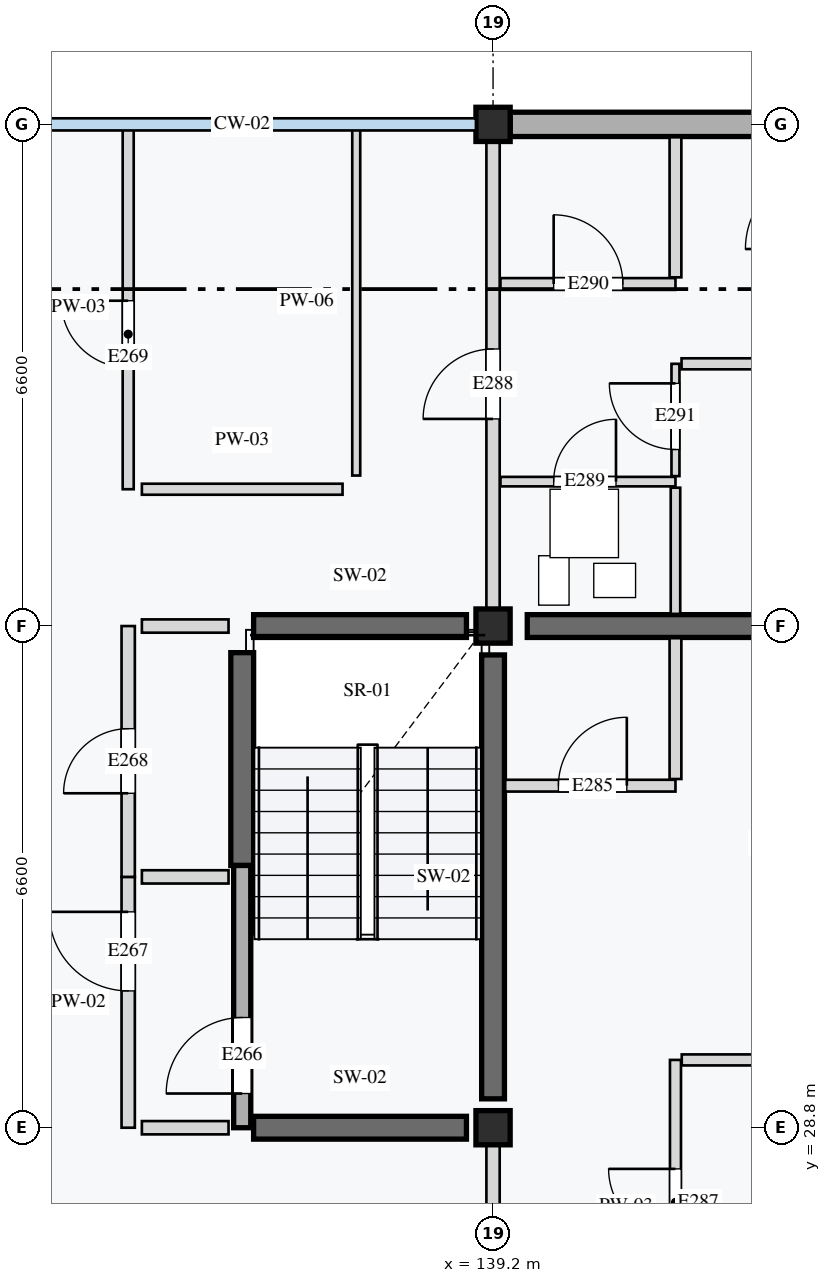
"""IFC4 building model, lengths in metres.
Left out: names, types, materials, properties, quantities, classifications, styles, units other than length and angle.
Written with IfcOpenShell. Run it as: python <this file> out.ifc"""

import sys

from ifc_helpers import new_model, si_unit, direction, frame, frame_2d, origin, origin_2d, place, context, subcontext, project, spatial, rectangle, extrude, element, fill, save


model = new_model("IFC4")
c1 = context("Model", 3, precision=1e-05, world=origin(), true_north=direction((0.0, 1.0)))
c2 = subcontext(c1, "Body", "Model", "MODEL_VIEW")
j1 = project(units=[si_unit("LENGTHUNIT", "METRE"), si_unit("PLANEANGLEUNIT", "RADIAN")], contexts=[c1])
p1 = place(None, origin())
s1 = spatial("IfcSite", under=j1, at=p1, CompositionType="ELEMENT")
p2 = place(p1, origin())
s2 = spatial("IfcBuilding", under=s1, at=p2, CompositionType="ELEMENT")
p3 = place(p2, frame((0.0, 0.0, 21.2)))
s3 = spatial("IfcBuildingStorey", under=s2, at=p3, CompositionType="ELEMENT", Elevation=21.2)
for number, where, z_axis, x_axis in (
    (1, (139.2, 28.8, 0.0), (0.0, 0.0, 1.0), (1.0, 0.0, 0.0)),
    (2, (139.2, 35.4, 0.0), (0.0, 0.0, 1.0), (1.0, 0.0, 0.0)),
    (3, (139.2, 42.0, 0.0), (0.0, 0.0, 1.0), (1.0, 0.0, 0.0)),
):
    element("IfcColumn", number, at=place(p3, frame(where, z_axis=z_axis, x_axis=x_axis)), inside=s3, PredefinedType="COLUMN", context=c2, shape_type="SweptSolid", body=[
        extrude(rectangle(XDim=0.45, YDim=0.45, at=origin_2d()), origin(), (0.0, 0.0, 1.0), 3.2),
    ])
p4 = place(p3, frame((139.2, 29.18, 0.0), z_axis=(0.0, 0.0, 1.0), x_axis=(0.0, 1.0, 0.0)))
e4 = element("IfcWall", 4, at=p4, inside=s3, PredefinedType="SHEAR", context=c2, shape_type="SweptSolid", body=[
    extrude(rectangle(XDim=5.84, YDim=0.3, at=frame_2d((2.92, 0.0))), origin(), (0.0, 0.0, 1.0), 2.96),
])
for number, where, z_axis, x_axis in (
    (5, (135.9, 32.25, 0.0), (0.0, 0.0, 1.0), (0.0, 1.0, 0.0)),
    (6, (136.05, 28.8, 0.0), (0.0, 0.0, 1.0), (1.0, 0.0, 0.0)),
    (7, (136.05, 35.4, 0.0), (0.0, 0.0, 1.0), (1.0, 0.0, 0.0)),
):
    element("IfcWall", number, at=place(p3, frame(where, z_axis=z_axis, x_axis=x_axis)), inside=s3, PredefinedType="SHEAR", context=c2, shape_type="SweptSolid", body=[
        extrude(rectangle(XDim=2.8, YDim=0.3, at=frame_2d((1.4, 0.0))), origin(), (0.0, 0.0, 1.0), 2.96),
    ])
p5 = place(p3, frame((139.65, 35.4, 0.0), z_axis=(0.0, 0.0, 1.0), x_axis=(1.0, 0.0, 0.0)))
e8 = element("IfcWall", 8, at=p5, inside=s3, PredefinedType="SHEAR", context=c2, shape_type="SweptSolid", body=[
    extrude(rectangle(XDim=5.7, YDim=0.3, at=frame_2d((2.85, 0.0))), origin(), (0.0, 0.0, 1.0), 2.96),
])
p6 = place(p3, frame((139.425, 42.0, 0.0), z_axis=(0.0, 0.0, 1.0), x_axis=(1.0, 0.0, 0.0)))
e9 = element("IfcWall", 9, at=p6, inside=s3, PredefinedType="STANDARD", context=c2, shape_type="SweptSolid", body=[
    extrude(rectangle(XDim=4.015, YDim=0.32, at=frame_2d((2.007, 0.0))), origin(), (0.0, 0.0, 1.0), 2.65),
])
p7 = place(p3, frame((135.9, 28.8, 0.0), z_axis=(0.0, 0.0, 1.0), x_axis=(0.0, 1.0, 0.0)))
e10 = element("IfcWall", 10, at=p7, inside=s3, PredefinedType="STANDARD", context=c2, shape_type="SweptSolid", body=[
    extrude(rectangle(XDim=3.45, YDim=0.225, at=frame_2d((1.725, 0.0))), origin(), (0.0, 0.0, 1.0), 2.96),
])
p8 = place(p7, frame((0.45, 0.0, 0.0)))
e11 = element("IfcOpeningElement", 11, at=p8, cuts=e10, PredefinedType="OPENING", context=c2, shape_type="SweptSolid", body=[
    extrude(rectangle(XDim=1.0, YDim=2.16, at=frame_2d((0.5, 1.08))), frame((0.0, 0.123, 0.0), z_axis=(0.0, -1.0, 0.0), x_axis=(1.0, 0.0, 0.0)), (0.0, 0.0, 1.0), 0.245),
])
p9 = place(p3, frame((134.4, 28.8, 0.0), z_axis=(0.0, 0.0, 1.0), x_axis=(0.0, 1.0, 0.0)))
e12 = element("IfcWall", 12, at=p9, inside=s3, PredefinedType="PARTITIONING", context=c2, shape_type="SweptSolid", body=[
    extrude(rectangle(XDim=3.3, YDim=0.175, at=frame_2d((1.65, 0.0))), origin(), (0.0, 0.0, 1.0), 2.96),
])
p10 = place(p9, frame((1.8, 0.0, 0.0)))
e13 = element("IfcOpeningElement", 13, at=p10, cuts=e12, PredefinedType="OPENING", context=c2, shape_type="SweptSolid", body=[
    extrude(rectangle(XDim=1.04, YDim=2.12, at=frame_2d((0.52, 1.06))), frame((0.0, 0.097, 0.0), z_axis=(0.0, -1.0, 0.0), x_axis=(1.0, 0.0, 0.0)), (0.0, 0.0, 1.0), 0.195),
])
p11 = place(p3, frame((134.4, 32.1, 0.0), z_axis=(0.0, 0.0, 1.0), x_axis=(0.0, 1.0, 0.0)))
e14 = element("IfcWall", 14, at=p11, inside=s3, PredefinedType="PARTITIONING", context=c2, shape_type="SweptSolid", body=[
    extrude(rectangle(XDim=3.3, YDim=0.175, at=frame_2d((1.65, 0.0))), origin(), (0.0, 0.0, 1.0), 2.96),
])
p12 = place(p11, frame((1.1, 0.0, 0.0)))
e15 = element("IfcOpeningElement", 15, at=p12, cuts=e14, PredefinedType="OPENING", context=c2, shape_type="SweptSolid", body=[
    extrude(rectangle(XDim=0.85, YDim=2.0, at=frame_2d((0.425, 1.0))), frame((0.0, 0.097, 0.0), z_axis=(0.0, -1.0, 0.0), x_axis=(1.0, 0.0, 0.0)), (0.0, 0.0, 1.0), 0.195),
])
for number, where, z_axis, x_axis in (
    (16, (134.58, 28.8, 0.0), (0.0, 0.0, 1.0), (1.0, 0.0, 0.0)),
    (17, (134.58, 32.1, 0.0), (0.0, 0.0, 1.0), (1.0, 0.0, 0.0)),
    (18, (134.58, 35.4, 0.0), (0.0, 0.0, 1.0), (1.0, 0.0, 0.0)),
):
    element("IfcWall", number, at=place(p3, frame(where, z_axis=z_axis, x_axis=x_axis)), inside=s3, PredefinedType="PARTITIONING", context=c2, shape_type="SweptSolid", body=[
        extrude(rectangle(XDim=1.14, YDim=0.175, at=frame_2d((0.57, 0.0))), origin(), (0.0, 0.0, 1.0), 2.96),
    ])
p13 = place(p3, frame((134.4, 37.2, 0.0), z_axis=(0.0, 0.0, 1.0), x_axis=(0.0, 1.0, 0.0)))
e19 = element("IfcWall", 19, at=p13, inside=s3, PredefinedType="PARTITIONING", context=c2, shape_type="SweptSolid", body=[
    extrude(rectangle(XDim=4.8, YDim=0.145, at=frame_2d((2.4, 0.0))), origin(), (0.0, 0.0, 1.0), 2.96),
])
p14 = place(p13, frame((1.6, 0.0, 0.0)))
e20 = element("IfcOpeningElement", 20, at=p14, cuts=e19, PredefinedType="OPENING", context=c2, shape_type="SweptSolid", body=[
    extrude(rectangle(XDim=0.88, YDim=2.1, at=frame_2d((0.44, 1.05))), frame((0.0, 0.083, 0.0), z_axis=(0.0, -1.0, 0.0), x_axis=(1.0, 0.0, 0.0)), (0.0, 0.0, 1.0), 0.165),
])
p15 = place(p3, frame((137.4, 37.38, 0.0), z_axis=(0.0, 0.0, 1.0), x_axis=(0.0, 1.0, 0.0)))
e21 = element("IfcWall", 21, at=p15, inside=s3, PredefinedType="PARTITIONING", context=c2, shape_type="SweptSolid", body=[
    extrude(rectangle(XDim=4.6, YDim=0.105, at=frame_2d((2.3, 0.0))), origin(), (0.0, 0.0, 1.0), 2.96),
])
p16 = place(p3, frame((134.58, 37.2, 0.0), z_axis=(0.0, 0.0, 1.0), x_axis=(1.0, 0.0, 0.0)))
e22 = element("IfcWall", 22, at=p16, inside=s3, PredefinedType="PARTITIONING", context=c2, shape_type="SweptSolid", body=[
    extrude(rectangle(XDim=2.64, YDim=0.145, at=frame_2d((1.32, 0.0))), origin(), (0.0, 0.0, 1.0), 2.96),
])
p17 = place(p3, frame((139.2, 22.2, 0.0), z_axis=(0.0, 0.0, 1.0), x_axis=(0.0, 1.0, 0.0)))
e23 = element("IfcWall", 23, at=p17, inside=s3, PredefinedType="PARTITIONING", context=c2, shape_type="SweptSolid", body=[
    extrude(rectangle(XDim=6.6, YDim=0.175, at=frame_2d((3.3, 0.0))), origin(), (0.0, 0.0, 1.0), 2.55),
])
p18 = place(p17, frame((3.85, 0.0, 0.0)))
e24 = element("IfcOpeningElement", 24, at=p18, cuts=e23, PredefinedType="OPENING", context=c2, shape_type="SweptSolid", body=[
    extrude(rectangle(XDim=0.95, YDim=2.16, at=frame_2d((0.475, 1.08))), frame((0.0, 0.097, 0.0), z_axis=(0.0, -1.0, 0.0), x_axis=(1.0, 0.0, 0.0)), (0.0, 0.0, 1.0), 0.195),
])
p19 = place(p3, frame((139.36, 33.3, 0.0), z_axis=(0.0, 0.0, 1.0), x_axis=(1.0, 0.0, 0.0)))
e25 = element("IfcWall", 25, at=p19, inside=s3, PredefinedType="PARTITIONING", context=c2, shape_type="SweptSolid", body=[
    extrude(rectangle(XDim=2.24, YDim=0.155, at=frame_2d((1.12, 0.0))), origin(), (0.0, 0.0, 1.0), 2.96),
])
p20 = place(p19, frame((0.7, 0.0, 0.0)))
e26 = element("IfcOpeningElement", 26, at=p20, cuts=e25, PredefinedType="OPENING", context=c2, shape_type="SweptSolid", body=[
    extrude(rectangle(XDim=0.9, YDim=2.16, at=frame_2d((0.45, 1.08))), frame((0.0, 0.087, 0.0), z_axis=(0.0, -1.0, 0.0), x_axis=(1.0, 0.0, 0.0)), (0.0, 0.0, 1.0), 0.175),
])
p21 = place(p3, frame((141.6, 33.387, 0.0), z_axis=(0.0, 0.0, 1.0), x_axis=(0.0, 1.0, 0.0)))
e27 = element("IfcWall", 27, at=p21, inside=s3, PredefinedType="PARTITIONING", context=c2, shape_type="SweptSolid", body=[
    extrude(rectangle(XDim=1.853, YDim=0.155, at=frame_2d((0.926, 0.0))), origin(), (0.0, 0.0, 1.0), 2.96),
])
p22 = place(p3, frame((141.6, 25.833, 0.0), z_axis=(0.0, 0.0, 1.0), x_axis=(0.0, 1.0, 0.0)))
e28 = element("IfcWall", 28, at=p22, inside=s3, PredefinedType="PARTITIONING", context=c2, shape_type="SweptSolid", body=[
    extrude(rectangle(XDim=3.859, YDim=0.145, at=frame_2d((1.93, 0.0))), origin(), (0.0, 0.0, 1.0), 2.96),
])
p23 = place(p22, frame((1.546, 0.0, 0.0)))
e29 = element("IfcOpeningElement", 29, at=p23, cuts=e28, PredefinedType="OPENING", context=c2, shape_type="SweptSolid", body=[
    extrude(rectangle(XDim=0.88, YDim=2.1, at=frame_2d((0.44, 1.05))), frame((0.0, 0.083, 0.0), z_axis=(0.0, -1.0, 0.0), x_axis=(1.0, 0.0, 0.0)), (0.0, 0.0, 1.0), 0.165),
])
p24 = place(p3, frame((141.683, 29.692, 0.0), z_axis=(0.0, 0.0, 1.0), x_axis=(1.0, 0.0, 0.0)))
e30 = element("IfcWall", 30, at=p24, inside=s3, PredefinedType="PARTITIONING", context=c2, shape_type="SweptSolid", body=[
    extrude(rectangle(XDim=3.947, YDim=0.145, at=frame_2d((1.974, 0.0))), origin(), (0.0, 0.0, 1.0), 2.96),
])
p25 = place(p3, frame((139.2, 35.4, 0.0), z_axis=(0.0, 0.0, 1.0), x_axis=(0.0, 1.0, 0.0)))
e31 = element("IfcWall", 31, at=p25, inside=s3, PredefinedType="PARTITIONING", context=c2, shape_type="SweptSolid", body=[
    extrude(rectangle(XDim=6.6, YDim=0.175, at=frame_2d((3.3, 0.0))), origin(), (0.0, 0.0, 1.0), 2.55),
])
p26 = place(p25, frame((2.725, 0.0, 0.0)))
e32 = element("IfcOpeningElement", 32, at=p26, cuts=e31, PredefinedType="OPENING", context=c2, shape_type="SweptSolid", body=[
    extrude(rectangle(XDim=0.92, YDim=2.14, at=frame_2d((0.46, 1.07))), frame((0.0, 0.097, 0.0), z_axis=(0.0, -1.0, 0.0), x_axis=(1.0, 0.0, 0.0)), (0.0, 0.0, 1.0), 0.195),
])
p27 = place(p3, frame((139.298, 37.3, 0.0), z_axis=(0.0, 0.0, 1.0), x_axis=(1.0, 0.0, 0.0)))
e33 = element("IfcWall", 33, at=p27, inside=s3, PredefinedType="PARTITIONING", context=c2, shape_type="SweptSolid", body=[
    extrude(rectangle(XDim=2.302, YDim=0.125, at=frame_2d((1.151, 0.0))), origin(), (0.0, 0.0, 1.0), 2.96),
])
p28 = place(p27, frame((0.7, 0.0, 0.0)))
e34 = element("IfcOpeningElement", 34, at=p28, cuts=e33, PredefinedType="OPENING", context=c2, shape_type="SweptSolid", body=[
    extrude(rectangle(XDim=0.82, YDim=2.05, at=frame_2d((0.41, 1.025))), frame((0.0, 0.073, 0.0), z_axis=(0.0, -1.0, 0.0), x_axis=(1.0, 0.0, 0.0)), (0.0, 0.0, 1.0), 0.145),
])
p29 = place(p3, frame((141.6, 35.56, 0.0), z_axis=(0.0, 0.0, 1.0), x_axis=(0.0, 1.0, 0.0)))
e35 = element("IfcWall", 35, at=p29, inside=s3, PredefinedType="PARTITIONING", context=c2, shape_type="SweptSolid", body=[
    extrude(rectangle(XDim=1.66, YDim=0.125, at=frame_2d((0.83, 0.0))), origin(), (0.0, 0.0, 1.0), 2.96),
])
p30 = place(p3, frame((139.298, 39.9, 0.0), z_axis=(0.0, 0.0, 1.0), x_axis=(1.0, 0.0, 0.0)))
e36 = element("IfcWall", 36, at=p30, inside=s3, PredefinedType="PARTITIONING", context=c2, shape_type="SweptSolid", body=[
    extrude(rectangle(XDim=2.302, YDim=0.155, at=frame_2d((1.151, 0.0))), origin(), (0.0, 0.0, 1.0), 2.96),
])
p31 = place(p30, frame((0.7, 0.0, 0.0)))
e37 = element("IfcOpeningElement", 37, at=p31, cuts=e36, PredefinedType="OPENING", context=c2, shape_type="SweptSolid", body=[
    extrude(rectangle(XDim=0.91, YDim=2.14, at=frame_2d((0.455, 1.07))), frame((0.0, 0.087, 0.0), z_axis=(0.0, -1.0, 0.0), x_axis=(1.0, 0.0, 0.0)), (0.0, 0.0, 1.0), 0.175),
])
p32 = place(p3, frame((141.6, 39.988, 0.0), z_axis=(0.0, 0.0, 1.0), x_axis=(0.0, 1.0, 0.0)))
e38 = element("IfcWall", 38, at=p32, inside=s3, PredefinedType="PARTITIONING", context=c2, shape_type="SweptSolid", body=[
    extrude(rectangle(XDim=1.843, YDim=0.155, at=frame_2d((0.921, 0.0))), origin(), (0.0, 0.0, 1.0), 2.96),
])
p33 = place(p3, frame((141.6, 37.373, 0.0), z_axis=(0.0, 0.0, 1.0), x_axis=(0.0, 1.0, 0.0)))
e39 = element("IfcWall", 39, at=p33, inside=s3, PredefinedType="PARTITIONING", context=c2, shape_type="SweptSolid", body=[
    extrude(rectangle(XDim=1.478, YDim=0.105, at=frame_2d((0.739, 0.0))), origin(), (0.0, 0.0, 1.0), 2.96),
])
p34 = place(p33, frame((0.35, 0.0, 0.0)))
e40 = element("IfcOpeningElement", 40, at=p34, cuts=e39, PredefinedType="OPENING", context=c2, shape_type="SweptSolid", body=[
    extrude(rectangle(XDim=0.87, YDim=2.08, at=frame_2d((0.435, 1.04))), frame((0.0, 0.062, 0.0), z_axis=(0.0, -1.0, 0.0), x_axis=(1.0, 0.0, 0.0)), (0.0, 0.0, 1.0), 0.125),
])
p35 = place(p3, frame((141.68, 38.85, 0.0), z_axis=(0.0, 0.0, 1.0), x_axis=(1.0, 0.0, 0.0)))
e41 = element("IfcWall", 41, at=p35, inside=s3, PredefinedType="PARTITIONING", context=c2, shape_type="SweptSolid", body=[
    extrude(rectangle(XDim=3.95, YDim=0.145, at=frame_2d((1.975, 0.0))), origin(), (0.0, 0.0, 1.0), 2.96),
])
p36 = place(p8, origin())
e42 = element("IfcDoor", 42, at=p36, inside=s3, OperationType="SINGLE_SWING_LEFT", PredefinedType="DOOR", context=c2, shape_type="SweptSolid", body=[
    extrude(rectangle(XDim=1.0, YDim=2.16, at=frame_2d((0.5, 1.08))), frame((0.0, 0.025, 0.0), z_axis=(0.0, -1.0, 0.0), x_axis=(1.0, 0.0, 0.0)), (0.0, 0.0, 1.0), 0.05),
])
fill(e11, e42)
p37 = place(p10, origin())
e43 = element("IfcDoor", 43, at=p37, inside=s3, OperationType="SINGLE_SWING_RIGHT", PredefinedType="DOOR", context=c2, shape_type="SweptSolid", body=[
    extrude(rectangle(XDim=1.04, YDim=2.12, at=frame_2d((0.52, 1.06))), frame((0.0, 0.025, 0.0), z_axis=(0.0, -1.0, 0.0), x_axis=(1.0, 0.0, 0.0)), (0.0, 0.0, 1.0), 0.05),
])
fill(e13, e43)
p38 = place(p12, origin())
e44 = element("IfcDoor", 44, at=p38, inside=s3, OperationType="SINGLE_SWING_LEFT", PredefinedType="DOOR", context=c2, shape_type="SweptSolid", body=[
    extrude(rectangle(XDim=0.85, YDim=2.0, at=frame_2d((0.425, 1.0))), frame((0.0, 0.025, 0.0), z_axis=(0.0, -1.0, 0.0), x_axis=(1.0, 0.0, 0.0)), (0.0, 0.0, 1.0), 0.05),
])
fill(e15, e44)
p39 = place(p14, origin())
e45 = element("IfcDoor", 45, at=p39, inside=s3, OperationType="SINGLE_SWING_RIGHT", PredefinedType="DOOR", context=c2, shape_type="SweptSolid", body=[
    extrude(rectangle(XDim=0.88, YDim=2.1, at=frame_2d((0.44, 1.05))), frame((0.0, 0.025, 0.0), z_axis=(0.0, -1.0, 0.0), x_axis=(1.0, 0.0, 0.0)), (0.0, 0.0, 1.0), 0.05),
])
fill(e20, e45)
p40 = place(p20, origin())
e46 = element("IfcDoor", 46, at=p40, inside=s3, OperationType="SINGLE_SWING_RIGHT", PredefinedType="DOOR", context=c2, shape_type="SweptSolid", body=[
    extrude(rectangle(XDim=0.9, YDim=2.16, at=frame_2d((0.45, 1.08))), frame((0.0, 0.025, 0.0), z_axis=(0.0, -1.0, 0.0), x_axis=(1.0, 0.0, 0.0)), (0.0, 0.0, 1.0), 0.05),
])
fill(e26, e46)
p41 = place(p23, origin())
e47 = element("IfcDoor", 47, at=p41, inside=s3, OperationType="SINGLE_SWING_RIGHT", PredefinedType="DOOR", context=c2, shape_type="SweptSolid", body=[
    extrude(rectangle(XDim=0.88, YDim=2.1, at=frame_2d((0.44, 1.05))), frame((0.0, 0.025, 0.0), z_axis=(0.0, -1.0, 0.0), x_axis=(1.0, 0.0, 0.0)), (0.0, 0.0, 1.0), 0.05),
])
fill(e29, e47)
p42 = place(p26, origin())
e48 = element("IfcDoor", 48, at=p42, inside=s3, OperationType="SINGLE_SWING_LEFT", PredefinedType="DOOR", context=c2, shape_type="SweptSolid", body=[
    extrude(rectangle(XDim=0.92, YDim=2.14, at=frame_2d((0.46, 1.07))), frame((0.0, 0.025, 0.0), z_axis=(0.0, -1.0, 0.0), x_axis=(1.0, 0.0, 0.0)), (0.0, 0.0, 1.0), 0.05),
])
fill(e32, e48)
p43 = place(p28, origin())
e49 = element("IfcDoor", 49, at=p43, inside=s3, OperationType="SINGLE_SWING_RIGHT", PredefinedType="DOOR", context=c2, shape_type="SweptSolid", body=[
    extrude(rectangle(XDim=0.82, YDim=2.05, at=frame_2d((0.41, 1.025))), frame((0.0, 0.025, 0.0), z_axis=(0.0, -1.0, 0.0), x_axis=(1.0, 0.0, 0.0)), (0.0, 0.0, 1.0), 0.05),
])
fill(e34, e49)
p44 = place(p31, origin())
e50 = element("IfcDoor", 50, at=p44, inside=s3, OperationType="SINGLE_SWING_LEFT", PredefinedType="DOOR", context=c2, shape_type="SweptSolid", body=[
    extrude(rectangle(XDim=0.91, YDim=2.14, at=frame_2d((0.455, 1.07))), frame((0.0, 0.025, 0.0), z_axis=(0.0, -1.0, 0.0), x_axis=(1.0, 0.0, 0.0)), (0.0, 0.0, 1.0), 0.05),
])
fill(e37, e50)
p45 = place(p34, origin())
e51 = element("IfcDoor", 51, at=p45, inside=s3, OperationType="SINGLE_SWING_RIGHT", PredefinedType="DOOR", context=c2, shape_type="SweptSolid", body=[
    extrude(rectangle(XDim=0.87, YDim=2.08, at=frame_2d((0.435, 1.04))), frame((0.0, 0.025, 0.0), z_axis=(0.0, -1.0, 0.0), x_axis=(1.0, 0.0, 0.0)), (0.0, 0.0, 1.0), 0.05),
])
fill(e40, e51)
save(model, sys.argv[1])
